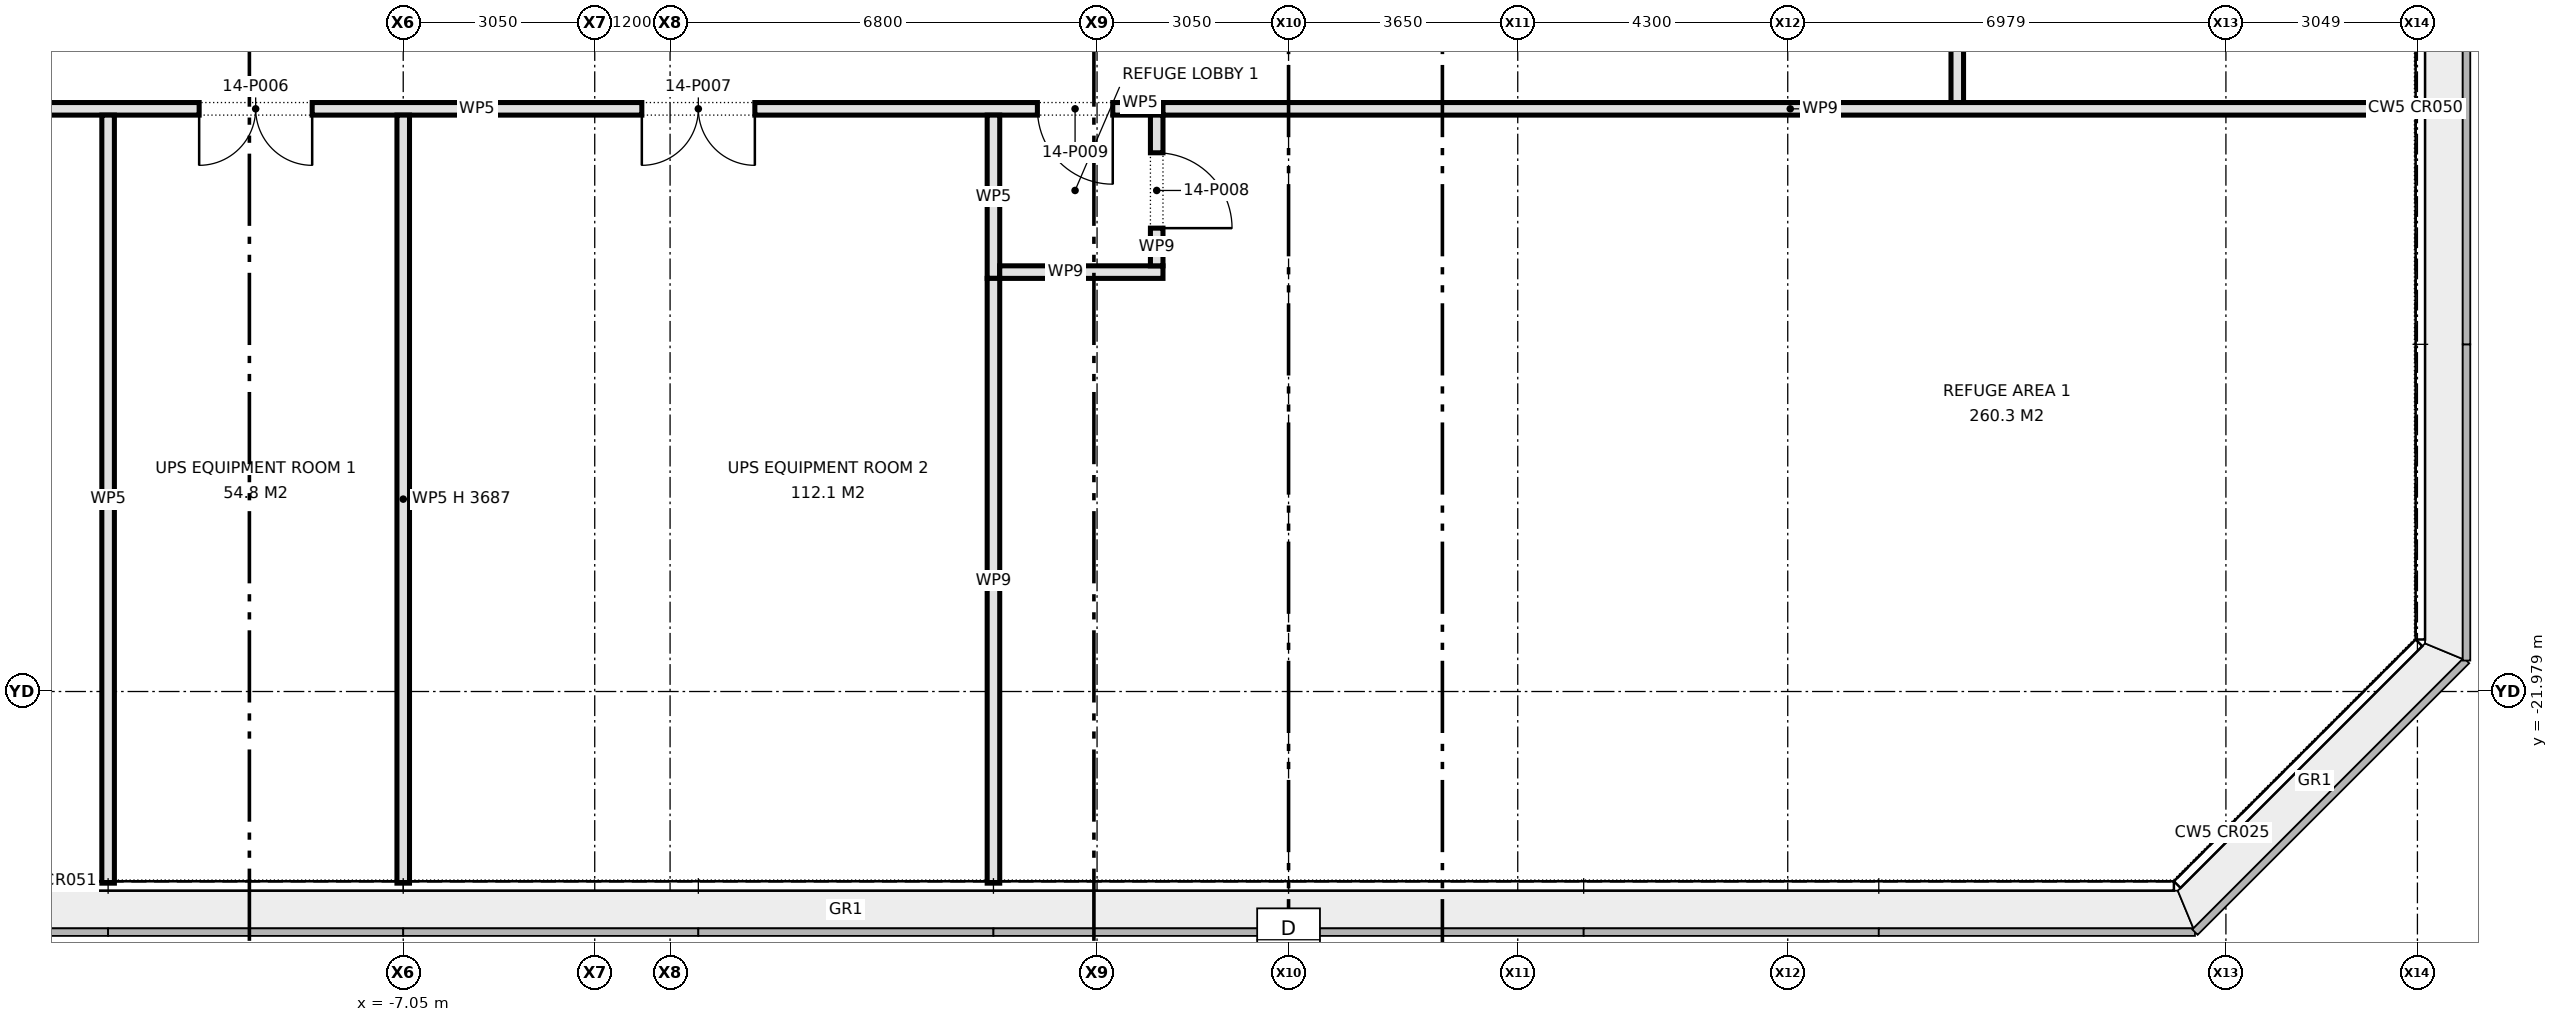
"""IFC4 building model, lengths in metres.
Left out: names, types, materials, properties, quantities, classifications, styles, units other than length and angle.
Written with IfcOpenShell. Run it as: python <this file> out.ifc"""

import sys

from ifc_helpers import new_model, si_unit, direction, frame, frame_2d, origin, place, context, subcontext, project, spatial, rectangle, extrude, element, fill, save


model = new_model("IFC4")
c1 = context("Model", 3, precision=1e-05, world=origin(), true_north=direction((0.0, 1.0)))
c2 = subcontext(c1, "Body", "Model", "MODEL_VIEW")
j1 = project(units=[si_unit("LENGTHUNIT", "METRE"), si_unit("PLANEANGLEUNIT", "RADIAN")], contexts=[c1])
p1 = place(None, origin())
s1 = spatial("IfcSite", under=j1, at=p1, CompositionType="ELEMENT")
p2 = place(p1, origin())
s2 = spatial("IfcBuilding", under=s1, at=p2, CompositionType="ELEMENT")
p3 = place(p2, frame((0.0, 0.0, 64.1)))
s3 = spatial("IfcBuildingStorey", under=s2, at=p3, CompositionType="ELEMENT", Elevation=64.1)
p4 = place(p3, frame((-17.8, -12.7, 0.0), z_axis=(0.0, 0.0, 1.0), x_axis=(1.0, 0.0, 0.0)))
e1 = element("IfcWall", 1, at=p4, inside=s3, PredefinedType="PARTITIONING", context=c2, shape_type="SweptSolid", body=[
    extrude(rectangle(XDim=22.85, YDim=0.2, at=frame_2d((11.425, 0.0))), origin(), (0.0, 0.0, 1.0), 4.3),
])
p5 = place(p4, frame((3.07, 0.0, 0.0)))
e2 = element("IfcOpeningElement", 2, at=p5, cuts=e1, PredefinedType="OPENING", context=c2, shape_type="SweptSolid", body=[
    extrude(rectangle(XDim=1.8, YDim=2.1, at=frame_2d((0.9, 1.05))), frame((0.0, 0.11, 0.0), z_axis=(0.0, -1.0, 0.0), x_axis=(1.0, 0.0, 0.0)), (0.0, 0.0, 1.0), 0.22),
])
p6 = place(p4, frame((7.5, 0.0, 0.0)))
e3 = element("IfcOpeningElement", 3, at=p6, cuts=e1, PredefinedType="OPENING", context=c2, shape_type="SweptSolid", body=[
    extrude(rectangle(XDim=1.8, YDim=2.1, at=frame_2d((0.9, 1.05))), frame((0.0, 0.11, 0.0), z_axis=(0.0, -1.0, 0.0), x_axis=(1.0, 0.0, 0.0)), (0.0, 0.0, 1.0), 0.22),
])
p7 = place(p4, frame((14.55, 0.0, 0.0)))
e4 = element("IfcOpeningElement", 4, at=p7, cuts=e1, PredefinedType="OPENING", context=c2, shape_type="SweptSolid", body=[
    extrude(rectangle(XDim=1.8, YDim=2.1, at=frame_2d((0.9, 1.05))), frame((0.0, 0.11, 0.0), z_axis=(0.0, -1.0, 0.0), x_axis=(1.0, 0.0, 0.0)), (0.0, 0.0, 1.0), 0.22),
])
p8 = place(p4, frame((20.85, 0.0, 0.0)))
e5 = element("IfcOpeningElement", 5, at=p8, cuts=e1, PredefinedType="OPENING", context=c2, shape_type="SweptSolid", body=[
    extrude(rectangle(XDim=1.2, YDim=2.1, at=frame_2d((0.6, 1.05))), frame((0.0, 0.11, 0.0), z_axis=(0.0, -1.0, 0.0), x_axis=(1.0, 0.0, 0.0)), (0.0, 0.0, 1.0), 0.22),
])
p9 = place(p3, frame((17.7, -12.6, 0.0), z_axis=(0.0, 0.0, 1.0), x_axis=(0.0, 1.0, 0.0)))
e6 = element("IfcWall", 6, at=p9, inside=s3, PredefinedType="PARTITIONING", context=c2, shape_type="SweptSolid", body=[
    extrude(rectangle(XDim=25.2, YDim=0.2, at=frame_2d((12.6, 0.0))), origin(), (0.0, 0.0, 1.0), 4.3),
])
p10 = place(p9, frame((2.475, 0.0, 0.0)))
e7 = element("IfcOpeningElement", 7, at=p10, cuts=e6, PredefinedType="OPENING", context=c2, shape_type="SweptSolid", body=[
    extrude(rectangle(XDim=1.2, YDim=2.1, at=frame_2d((0.6, 1.05))), frame((0.0, 0.11, 0.0), z_axis=(0.0, -1.0, 0.0), x_axis=(1.0, 0.0, 0.0)), (0.0, 0.0, 1.0), 0.22),
])
p11 = place(p9, frame((9.65, 0.0, 0.0)))
e8 = element("IfcOpeningElement", 8, at=p11, cuts=e6, PredefinedType="OPENING", context=c2, shape_type="SweptSolid", body=[
    extrude(rectangle(XDim=1.2, YDim=2.1, at=frame_2d((0.6, 1.05))), frame((0.0, 0.11, 0.0), z_axis=(0.0, -1.0, 0.0), x_axis=(1.0, 0.0, 0.0)), (0.0, 0.0, 1.0), 0.22),
])
p12 = place(p9, frame((16.4, 0.0, 0.0)))
e9 = element("IfcOpeningElement", 9, at=p12, cuts=e6, PredefinedType="OPENING", context=c2, shape_type="SweptSolid", body=[
    extrude(rectangle(XDim=1.8, YDim=2.1, at=frame_2d((0.9, 1.05))), frame((0.0, 0.11, 0.0), z_axis=(0.0, -1.0, 0.0), x_axis=(1.0, 0.0, 0.0)), (0.0, 0.0, 1.0), 0.22),
])
p13 = place(p9, frame((20.525, 0.0, 0.0)))
e10 = element("IfcOpeningElement", 10, at=p13, cuts=e6, PredefinedType="OPENING", context=c2, shape_type="SweptSolid", body=[
    extrude(rectangle(XDim=1.8, YDim=2.1, at=frame_2d((0.9, 1.05))), frame((0.0, 0.11, 0.0), z_axis=(0.0, -1.0, 0.0), x_axis=(1.0, 0.0, 0.0)), (0.0, 0.0, 1.0), 0.22),
])
p14 = place(p3, frame((2.35, -15.4, 0.0), z_axis=(0.0, 0.0, 1.0), x_axis=(0.0, 1.0, 0.0)))
e11 = element("IfcWall", 11, at=p14, inside=s3, PredefinedType="PARTITIONING", context=c2, shape_type="SweptSolid", body=[
    extrude(rectangle(XDim=2.6, YDim=0.2, at=frame_2d((1.3, 0.0))), origin(), (0.0, 0.0, 1.0), 4.3),
])
p15 = place(p3, frame((-7.05, -25.03, 0.0), z_axis=(0.0, 0.0, 1.0), x_axis=(0.0, 1.0, 0.0)))
e12 = element("IfcWall", 12, at=p15, inside=s3, PredefinedType="PARTITIONING", context=c2, shape_type="SweptSolid", body=[
    extrude(rectangle(XDim=12.23, YDim=0.2, at=frame_2d((6.115, 0.0))), origin(), (0.0, 0.0, 1.0), 3.687),
])
p16 = place(p3, frame((-11.75, -25.03, 0.0), z_axis=(0.0, 0.0, 1.0), x_axis=(0.0, 1.0, 0.0)))
e13 = element("IfcWall", 13, at=p16, inside=s3, PredefinedType="PARTITIONING", context=c2, shape_type="SweptSolid", body=[
    extrude(rectangle(XDim=12.23, YDim=0.2, at=frame_2d((6.115, 0.0))), origin(), (0.0, 0.0, 1.0), 4.3),
])
p17 = place(p3, frame((2.45, -15.3, 0.0), z_axis=(0.0, 0.0, 1.0), x_axis=(1.0, 0.0, 0.0)))
e14 = element("IfcWall", 14, at=p17, inside=s3, PredefinedType="PARTITIONING", context=c2, shape_type="SweptSolid", body=[
    extrude(rectangle(XDim=2.6, YDim=0.2, at=frame_2d((1.3, 0.0))), origin(), (0.0, 0.0, 1.0), 4.3),
])
p18 = place(p3, frame((5.05, -12.7, 0.0), z_axis=(0.0, 0.0, 1.0), x_axis=(1.0, 0.0, 0.0)))
e15 = element("IfcWall", 15, at=p18, inside=s3, PredefinedType="PARTITIONING", context=c2, shape_type="SweptSolid", body=[
    extrude(rectangle(XDim=19.98, YDim=0.2, at=frame_2d((9.99, 0.0))), origin(), (0.0, 0.0, 1.0), 4.3),
])
p19 = place(p3, frame((4.95, -15.2, 0.0), z_axis=(0.0, 0.0, 1.0), x_axis=(0.0, 1.0, 0.0)))
e16 = element("IfcWall", 16, at=p19, inside=s3, PredefinedType="PARTITIONING", context=c2, shape_type="SweptSolid", body=[
    extrude(rectangle(XDim=2.4, YDim=0.2, at=frame_2d((1.2, 0.0))), origin(), (0.0, 0.0, 1.0), 4.3),
])
p20 = place(p19, frame((0.6, 0.0, 0.0)))
e17 = element("IfcOpeningElement", 17, at=p20, cuts=e16, PredefinedType="OPENING", context=c2, shape_type="SweptSolid", body=[
    extrude(rectangle(XDim=1.2, YDim=2.1, at=frame_2d((0.6, 1.05))), frame((0.0, 0.11, 0.0), z_axis=(0.0, -1.0, 0.0), x_axis=(1.0, 0.0, 0.0)), (0.0, 0.0, 1.0), 0.22),
])
p21 = place(p3, frame((2.35, -25.03, 0.0), z_axis=(0.0, 0.0, 1.0), x_axis=(0.0, 1.0, 0.0)))
e18 = element("IfcWall", 18, at=p21, inside=s3, PredefinedType="PARTITIONING", context=c2, shape_type="SweptSolid", body=[
    extrude(rectangle(XDim=9.63, YDim=0.2, at=frame_2d((4.815, 0.0))), origin(), (0.0, 0.0, 1.0), 4.3),
])
p22 = place(p6, frame((1.8, 0.0, 0.0), z_axis=(0.0, 0.0, 1.0), x_axis=(-1.0, 0.0, 0.0)))
e19 = element("IfcDoor", 19, at=p22, inside=s3, OperationType="DOUBLE_DOOR_SINGLE_SWING", PredefinedType="DOOR", context=c2, shape_type="SweptSolid", body=[
    extrude(rectangle(XDim=1.8, YDim=2.1, at=frame_2d((0.9, 1.05))), frame((0.0, 0.025, 0.0), z_axis=(0.0, -1.0, 0.0), x_axis=(1.0, 0.0, 0.0)), (0.0, 0.0, 1.0), 0.05),
])
fill(e3, e19)
p23 = place(p7, frame((1.8, 0.0, 0.0), z_axis=(0.0, 0.0, 1.0), x_axis=(-1.0, 0.0, 0.0)))
e20 = element("IfcDoor", 20, at=p23, inside=s3, OperationType="DOUBLE_DOOR_SINGLE_SWING", PredefinedType="DOOR", context=c2, shape_type="SweptSolid", body=[
    extrude(rectangle(XDim=1.8, YDim=2.1, at=frame_2d((0.9, 1.05))), frame((0.0, 0.025, 0.0), z_axis=(0.0, -1.0, 0.0), x_axis=(1.0, 0.0, 0.0)), (0.0, 0.0, 1.0), 0.05),
])
fill(e4, e20)
p24 = place(p20, frame((1.2, 0.0, 0.0), z_axis=(0.0, 0.0, 1.0), x_axis=(-1.0, 0.0, 0.0)))
e21 = element("IfcDoor", 21, at=p24, inside=s3, OperationType="SINGLE_SWING_RIGHT", PredefinedType="DOOR", context=c2, shape_type="SweptSolid", body=[
    extrude(rectangle(XDim=1.2, YDim=2.1, at=frame_2d((0.6, 1.05))), frame((0.0, 0.025, 0.0), z_axis=(0.0, -1.0, 0.0), x_axis=(1.0, 0.0, 0.0)), (0.0, 0.0, 1.0), 0.05),
])
fill(e17, e21)
p25 = place(p8, frame((1.2, 0.0, 0.0), z_axis=(0.0, 0.0, 1.0), x_axis=(-1.0, 0.0, 0.0)))
e22 = element("IfcDoor", 22, at=p25, inside=s3, OperationType="SINGLE_SWING_LEFT", PredefinedType="DOOR", context=c2, shape_type="SweptSolid", body=[
    extrude(rectangle(XDim=1.2, YDim=2.1, at=frame_2d((0.6, 1.05))), frame((0.0, 0.025, 0.0), z_axis=(0.0, -1.0, 0.0), x_axis=(1.0, 0.0, 0.0)), (0.0, 0.0, 1.0), 0.05),
])
fill(e5, e22)
save(model, sys.argv[1])
